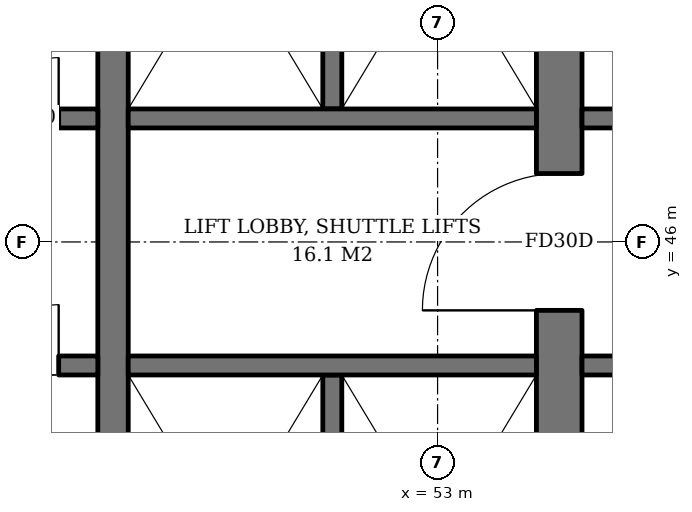
"""IFC4 building model, lengths in metres.
Left out: names, types, materials, properties, quantities, classifications, styles, units other than length and angle.
Written with IfcOpenShell. Run it as: python <this file> out.ifc"""

import sys

from ifc_helpers import new_model, si_unit, direction, frame, frame_2d, origin, place, context, subcontext, project, spatial, rectangle, extrude, element, fill, save


model = new_model("IFC4")
c1 = context("Model", 3, precision=1e-05, world=origin(), true_north=direction((0.0, 1.0)))
c2 = subcontext(c1, "Body", "Model", "MODEL_VIEW")
j1 = project(units=[si_unit("LENGTHUNIT", "METRE"), si_unit("PLANEANGLEUNIT", "RADIAN")], contexts=[c1])
p1 = place(None, origin())
s1 = spatial("IfcSite", under=j1, at=p1, CompositionType="ELEMENT")
p2 = place(p1, origin())
s2 = spatial("IfcBuilding", under=s1, at=p2, CompositionType="ELEMENT")
p3 = place(p2, frame((0.0, 0.0, 59.0)))
s3 = spatial("IfcBuildingStorey", under=s2, at=p3, CompositionType="ELEMENT", Elevation=59.0)
p4 = place(p3, frame((54.6, 36.7, 0.0), z_axis=(0.0, 0.0, 1.0), x_axis=(0.0, 1.0, 0.0)))
e1 = element("IfcWall", 1, at=p4, inside=s3, PredefinedType="SHEAR", context=c2, shape_type="SweptSolid", body=[
    extrude(rectangle(XDim=18.6, YDim=0.6, at=frame_2d((9.3, 0.0))), origin(), (0.0, 0.0, 1.0), 3.8),
])
p5 = place(p4, frame((8.4, 0.0, 0.0)))
e2 = element("IfcOpeningElement", 2, at=p5, cuts=e1, PredefinedType="OPENING", context=c2, shape_type="SweptSolid", body=[
    extrude(rectangle(XDim=1.8, YDim=2.4, at=frame_2d((0.9, 1.2))), frame((0.0, 0.31, 0.0), z_axis=(0.0, -1.0, 0.0), x_axis=(1.0, 0.0, 0.0)), (0.0, 0.0, 1.0), 0.62),
])
p6 = place(p3, frame((48.73, 40.0, 0.0), z_axis=(0.0, 0.0, 1.0), x_axis=(0.0, 1.0, 0.0)))
e3 = element("IfcWall", 3, at=p6, inside=s3, PredefinedType="SHEAR", context=c2, shape_type="SweptSolid", body=[
    extrude(rectangle(XDim=12.0, YDim=0.4, at=frame_2d((6.0, 0.0))), origin(), (0.0, 0.0, 1.0), 3.8),
])
p7 = place(p3, frame((35.7, 47.625, 0.0), z_axis=(0.0, 0.0, 1.0), x_axis=(1.0, 0.0, 0.0)))
e4 = element("IfcWall", 4, at=p7, inside=s3, PredefinedType="SHEAR", context=c2, shape_type="SweptSolid", body=[
    extrude(rectangle(XDim=12.83, YDim=0.25, at=frame_2d((6.415, 0.0))), origin(), (0.0, 0.0, 1.0), 3.8),
])
p8 = place(p7, frame((0.7, 0.0, 0.0)))
e5 = element("IfcOpeningElement", 5, at=p8, cuts=e4, PredefinedType="OPENING", context=c2, shape_type="SweptSolid", body=[
    extrude(rectangle(XDim=1.1, YDim=2.2, at=frame_2d((0.55, 1.1))), frame((0.0, 0.135, 0.0), z_axis=(0.0, -1.0, 0.0), x_axis=(1.0, 0.0, 0.0)), (0.0, 0.0, 1.0), 0.27),
])
p9 = place(p7, frame((3.45, 0.0, 0.0)))
e6 = element("IfcOpeningElement", 6, at=p9, cuts=e4, PredefinedType="OPENING", context=c2, shape_type="SweptSolid", body=[
    extrude(rectangle(XDim=1.1, YDim=2.2, at=frame_2d((0.55, 1.1))), frame((0.0, 0.135, 0.0), z_axis=(0.0, -1.0, 0.0), x_axis=(1.0, 0.0, 0.0)), (0.0, 0.0, 1.0), 0.27),
])
p10 = place(p7, frame((6.2, 0.0, 0.0)))
e7 = element("IfcOpeningElement", 7, at=p10, cuts=e4, PredefinedType="OPENING", context=c2, shape_type="SweptSolid", body=[
    extrude(rectangle(XDim=1.1, YDim=2.2, at=frame_2d((0.55, 1.1))), frame((0.0, 0.135, 0.0), z_axis=(0.0, -1.0, 0.0), x_axis=(1.0, 0.0, 0.0)), (0.0, 0.0, 1.0), 0.27),
])
p11 = place(p7, frame((8.95, 0.0, 0.0)))
e8 = element("IfcOpeningElement", 8, at=p11, cuts=e4, PredefinedType="OPENING", context=c2, shape_type="SweptSolid", body=[
    extrude(rectangle(XDim=1.1, YDim=2.2, at=frame_2d((0.55, 1.1))), frame((0.0, 0.135, 0.0), z_axis=(0.0, -1.0, 0.0), x_axis=(1.0, 0.0, 0.0)), (0.0, 0.0, 1.0), 0.27),
])
p12 = place(p7, frame((11.515, 0.0, 0.0)))
e9 = element("IfcOpeningElement", 9, at=p12, cuts=e4, PredefinedType="OPENING", context=c2, shape_type="SweptSolid", body=[
    extrude(rectangle(XDim=0.8, YDim=2.0, at=frame_2d((0.4, 1.0))), frame((0.0, 0.135, 0.0), z_axis=(0.0, -1.0, 0.0), x_axis=(1.0, 0.0, 0.0)), (0.0, 0.0, 1.0), 0.27),
])
p13 = place(p3, frame((35.7, 44.375, 0.0), z_axis=(0.0, 0.0, 1.0), x_axis=(1.0, 0.0, 0.0)))
e10 = element("IfcWall", 10, at=p13, inside=s3, PredefinedType="SHEAR", context=c2, shape_type="SweptSolid", body=[
    extrude(rectangle(XDim=12.83, YDim=0.25, at=frame_2d((6.415, 0.0))), origin(), (0.0, 0.0, 1.0), 3.8),
])
p14 = place(p13, frame((0.7, 0.0, 0.0)))
e11 = element("IfcOpeningElement", 11, at=p14, cuts=e10, PredefinedType="OPENING", context=c2, shape_type="SweptSolid", body=[
    extrude(rectangle(XDim=1.1, YDim=2.2, at=frame_2d((0.55, 1.1))), frame((0.0, 0.135, 0.0), z_axis=(0.0, -1.0, 0.0), x_axis=(1.0, 0.0, 0.0)), (0.0, 0.0, 1.0), 0.27),
])
p15 = place(p13, frame((3.45, 0.0, 0.0)))
e12 = element("IfcOpeningElement", 12, at=p15, cuts=e10, PredefinedType="OPENING", context=c2, shape_type="SweptSolid", body=[
    extrude(rectangle(XDim=1.1, YDim=2.2, at=frame_2d((0.55, 1.1))), frame((0.0, 0.135, 0.0), z_axis=(0.0, -1.0, 0.0), x_axis=(1.0, 0.0, 0.0)), (0.0, 0.0, 1.0), 0.27),
])
p16 = place(p13, frame((6.2, 0.0, 0.0)))
e13 = element("IfcOpeningElement", 13, at=p16, cuts=e10, PredefinedType="OPENING", context=c2, shape_type="SweptSolid", body=[
    extrude(rectangle(XDim=1.1, YDim=2.2, at=frame_2d((0.55, 1.1))), frame((0.0, 0.135, 0.0), z_axis=(0.0, -1.0, 0.0), x_axis=(1.0, 0.0, 0.0)), (0.0, 0.0, 1.0), 0.27),
])
p17 = place(p13, frame((8.95, 0.0, 0.0)))
e14 = element("IfcOpeningElement", 14, at=p17, cuts=e10, PredefinedType="OPENING", context=c2, shape_type="SweptSolid", body=[
    extrude(rectangle(XDim=1.1, YDim=2.2, at=frame_2d((0.55, 1.1))), frame((0.0, 0.135, 0.0), z_axis=(0.0, -1.0, 0.0), x_axis=(1.0, 0.0, 0.0)), (0.0, 0.0, 1.0), 0.27),
])
p18 = place(p13, frame((11.515, 0.0, 0.0)))
e15 = element("IfcOpeningElement", 15, at=p18, cuts=e10, PredefinedType="OPENING", context=c2, shape_type="SweptSolid", body=[
    extrude(rectangle(XDim=0.8, YDim=2.0, at=frame_2d((0.4, 1.0))), frame((0.0, 0.135, 0.0), z_axis=(0.0, -1.0, 0.0), x_axis=(1.0, 0.0, 0.0)), (0.0, 0.0, 1.0), 0.27),
])
p19 = place(p3, frame((51.615, 47.75, 0.0), z_axis=(0.0, 0.0, 1.0), x_axis=(0.0, 1.0, 0.0)))
e16 = element("IfcWall", 16, at=p19, inside=s3, PredefinedType="SHEAR", context=c2, shape_type="SweptSolid", body=[
    extrude(rectangle(XDim=4.25, YDim=0.25, at=frame_2d((2.125, 0.0))), origin(), (0.0, 0.0, 1.0), 3.8),
])
p20 = place(p3, frame((48.93, 47.625, 0.0), z_axis=(0.0, 0.0, 1.0), x_axis=(1.0, 0.0, 0.0)))
e17 = element("IfcWall", 17, at=p20, inside=s3, PredefinedType="SHEAR", context=c2, shape_type="SweptSolid", body=[
    extrude(rectangle(XDim=5.37, YDim=0.25, at=frame_2d((2.685, 0.0))), origin(), (0.0, 0.0, 1.0), 3.8),
])
p21 = place(p3, frame((51.615, 44.25, 0.0), z_axis=(0.0, 0.0, 1.0), x_axis=(0.0, -1.0, 0.0)))
e18 = element("IfcWall", 18, at=p21, inside=s3, PredefinedType="SHEAR", context=c2, shape_type="SweptSolid", body=[
    extrude(rectangle(XDim=4.25, YDim=0.25, at=frame_2d((2.125, 0.0))), origin(), (0.0, 0.0, 1.0), 3.8),
])
p22 = place(p3, frame((48.93, 44.375, 0.0), z_axis=(0.0, 0.0, 1.0), x_axis=(1.0, 0.0, 0.0)))
e19 = element("IfcWall", 19, at=p22, inside=s3, PredefinedType="SHEAR", context=c2, shape_type="SweptSolid", body=[
    extrude(rectangle(XDim=5.37, YDim=0.25, at=frame_2d((2.685, 0.0))), origin(), (0.0, 0.0, 1.0), 3.8),
])
for number, where, z_axis, x_axis in (
    (20, (54.9, 44.375, 0.0), (0.0, 0.0, 1.0), (1.0, 0.0, 0.0)),
    (21, (54.9, 47.625, 0.0), (0.0, 0.0, 1.0), (1.0, 0.0, 0.0)),
):
    element("IfcWall", number, at=place(p3, frame(where, z_axis=z_axis, x_axis=x_axis)), inside=s3, PredefinedType="SOLIDWALL", context=c2, shape_type="SweptSolid", body=[
        extrude(rectangle(XDim=2.6, YDim=0.25, at=frame_2d((1.3, 0.0))), origin(), (0.0, 0.0, 1.0), 3.62),
    ])
p23 = place(p12, origin())
e22 = element("IfcDoor", 22, at=p23, inside=s3, OperationType="SINGLE_SWING_RIGHT", PredefinedType="DOOR", context=c2, shape_type="SweptSolid", body=[
    extrude(rectangle(XDim=0.8, YDim=2.0, at=frame_2d((0.4, 1.0))), frame((0.0, 0.025, 0.0), z_axis=(0.0, -1.0, 0.0), x_axis=(1.0, 0.0, 0.0)), (0.0, 0.0, 1.0), 0.05),
])
fill(e9, e22)
p24 = place(p18, origin())
e23 = element("IfcDoor", 23, at=p24, inside=s3, OperationType="SINGLE_SWING_RIGHT", PredefinedType="DOOR", context=c2, shape_type="SweptSolid", body=[
    extrude(rectangle(XDim=0.8, YDim=2.0, at=frame_2d((0.4, 1.0))), frame((0.0, 0.025, 0.0), z_axis=(0.0, -1.0, 0.0), x_axis=(1.0, 0.0, 0.0)), (0.0, 0.0, 1.0), 0.05),
])
fill(e15, e23)
p25 = place(p5, origin())
e24 = element("IfcDoor", 24, at=p25, inside=s3, OperationType="DOUBLE_DOOR_SINGLE_SWING", PredefinedType="DOOR", context=c2, shape_type="SweptSolid", body=[
    extrude(rectangle(XDim=1.8, YDim=2.4, at=frame_2d((0.9, 1.2))), frame((0.0, 0.025, 0.0), z_axis=(0.0, -1.0, 0.0), x_axis=(1.0, 0.0, 0.0)), (0.0, 0.0, 1.0), 0.05),
])
fill(e2, e24)
save(model, sys.argv[1])
